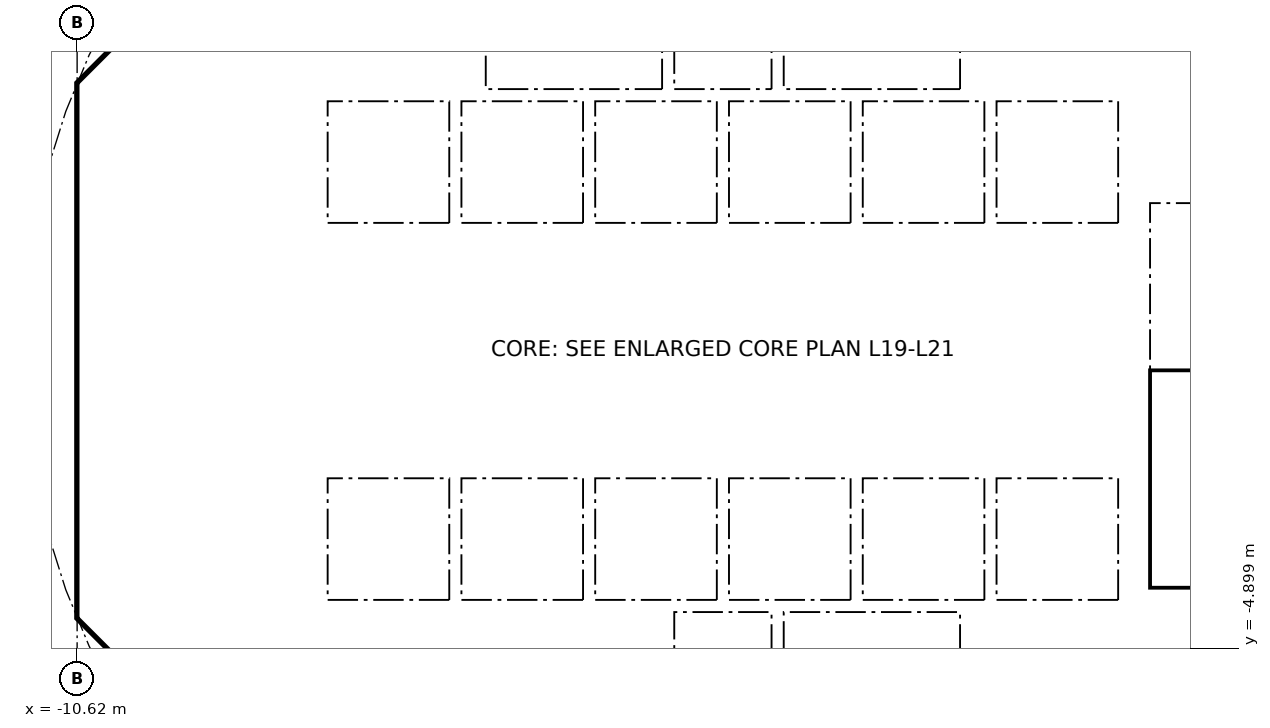
"""IFC4 building model, lengths in metres.
Left out: names, types, materials, properties, quantities, classifications, styles, units other than length and angle.
Written with IfcOpenShell. Run it as: python <this file> out.ifc"""

import sys

from ifc_helpers import new_model, si_unit, direction, frame, frame_2d, origin, place, context, subcontext, project, spatial, polyline, rectangle, outline, extrude, element, fill, save


model = new_model("IFC4")
c1 = context("Model", 3, precision=1e-05, world=origin(), true_north=direction((0.0, 1.0)))
c2 = subcontext(c1, "Body", "Model", "MODEL_VIEW")
j1 = project(units=[si_unit("LENGTHUNIT", "METRE"), si_unit("PLANEANGLEUNIT", "RADIAN")], contexts=[c1])
p1 = place(None, origin())
s1 = spatial("IfcSite", under=j1, at=p1, CompositionType="ELEMENT")
p2 = place(p1, origin())
s2 = spatial("IfcBuilding", under=s1, at=p2, CompositionType="ELEMENT")
p3 = place(p2, frame((0.0, 0.0, 88.1)))
s3 = spatial("IfcBuildingStorey", under=s2, at=p3, CompositionType="ELEMENT", Elevation=88.1)
p4 = place(p3, frame((9.988, 4.613, 0.0), z_axis=(0.0, 0.0, 1.0), x_axis=(-0.707106781187, 0.707106781187, 0.0)))
e1 = element("IfcWall", 1, at=p4, inside=s3, PredefinedType="SHEAR", context=c2, shape_type="SweptSolid", body=[
    extrude(rectangle(XDim=7.602, YDim=0.6, at=frame_2d((3.801, 0.0))), origin(), (0.0, 0.0, 1.0), 3.44),
])
p5 = place(p4, frame((3.201, 0.0, 0.0)))
e2 = element("IfcOpeningElement", 2, at=p5, cuts=e1, PredefinedType="OPENING", context=c2, shape_type="SweptSolid", body=[
    extrude(rectangle(XDim=1.2, YDim=2.1, at=frame_2d((0.6, 1.05))), frame((0.0, 0.31, 0.0), z_axis=(0.0, -1.0, 0.0), x_axis=(1.0, 0.0, 0.0)), (0.0, 0.0, 1.0), 0.62),
])
p6 = place(p3, frame((-4.613, 9.988, 0.0), z_axis=(0.0, 0.0, 1.0), x_axis=(-0.707106781187, -0.707106781187, 0.0)))
e3 = element("IfcWall", 3, at=p6, inside=s3, PredefinedType="SHEAR", context=c2, shape_type="SweptSolid", body=[
    extrude(rectangle(XDim=7.602, YDim=0.6, at=frame_2d((3.801, 0.0))), origin(), (0.0, 0.0, 1.0), 3.44),
])
p7 = place(p6, frame((0.351, 0.0, 0.0)))
e4 = element("IfcOpeningElement", 4, at=p7, cuts=e3, PredefinedType="OPENING", context=c2, shape_type="SweptSolid", body=[
    extrude(rectangle(XDim=1.1, YDim=2.1, at=frame_2d((0.55, 1.05))), frame((0.0, 0.31, 0.0), z_axis=(0.0, -1.0, 0.0), x_axis=(1.0, 0.0, 0.0)), (0.0, 0.0, 1.0), 0.62),
])
p8 = place(p3, frame((-10.325, 3.801, 0.0), z_axis=(0.0, 0.0, 1.0), x_axis=(0.0, -1.0, 0.0)))
e5 = element("IfcWall", 5, at=p8, inside=s3, PredefinedType="SHEAR", context=c2, shape_type="SweptSolid", body=[
    extrude(rectangle(XDim=7.602, YDim=0.6, at=frame_2d((3.801, 0.0))), origin(), (0.0, 0.0, 1.0), 3.44),
])
p9 = place(p8, frame((0.651, 0.0, 0.0)))
e6 = element("IfcOpeningElement", 6, at=p9, cuts=e5, PredefinedType="OPENING", context=c2, shape_type="SweptSolid", body=[
    extrude(rectangle(XDim=1.5, YDim=2.1, at=frame_2d((0.75, 1.05))), frame((0.0, 0.31, 0.0), z_axis=(0.0, -1.0, 0.0), x_axis=(1.0, 0.0, 0.0)), (0.0, 0.0, 1.0), 0.62),
])
p10 = place(p8, frame((5.451, 0.0, 0.0)))
e7 = element("IfcOpeningElement", 7, at=p10, cuts=e5, PredefinedType="OPENING", context=c2, shape_type="SweptSolid", body=[
    extrude(rectangle(XDim=1.5, YDim=2.1, at=frame_2d((0.75, 1.05))), frame((0.0, 0.31, 0.0), z_axis=(0.0, -1.0, 0.0), x_axis=(1.0, 0.0, 0.0)), (0.0, 0.0, 1.0), 0.62),
])
p11 = place(p3, frame((-9.988, -4.613, 0.0), z_axis=(0.0, 0.0, 1.0), x_axis=(0.707106781187, -0.707106781187, 0.0)))
e8 = element("IfcWall", 8, at=p11, inside=s3, PredefinedType="SHEAR", context=c2, shape_type="SweptSolid", body=[
    extrude(rectangle(XDim=7.602, YDim=0.6, at=frame_2d((3.801, 0.0))), origin(), (0.0, 0.0, 1.0), 3.44),
])
p12 = place(p11, frame((6.151, 0.0, 0.0)))
e9 = element("IfcOpeningElement", 9, at=p12, cuts=e8, PredefinedType="OPENING", context=c2, shape_type="SweptSolid", body=[
    extrude(rectangle(XDim=1.1, YDim=2.1, at=frame_2d((0.55, 1.05))), frame((0.0, 0.31, 0.0), z_axis=(0.0, -1.0, 0.0), x_axis=(1.0, 0.0, 0.0)), (0.0, 0.0, 1.0), 0.62),
])
p13 = place(p3, frame((4.613, -9.988, 0.0), z_axis=(0.0, 0.0, 1.0), x_axis=(0.707106781187, 0.707106781187, 0.0)))
e10 = element("IfcWall", 10, at=p13, inside=s3, PredefinedType="SHEAR", context=c2, shape_type="SweptSolid", body=[
    extrude(rectangle(XDim=7.602, YDim=0.6, at=frame_2d((3.801, 0.0))), origin(), (0.0, 0.0, 1.0), 3.44),
])
p14 = place(p13, frame((3.201, 0.0, 0.0)))
e11 = element("IfcOpeningElement", 11, at=p14, cuts=e10, PredefinedType="OPENING", context=c2, shape_type="SweptSolid", body=[
    extrude(rectangle(XDim=1.2, YDim=2.1, at=frame_2d((0.6, 1.05))), frame((0.0, 0.31, 0.0), z_axis=(0.0, -1.0, 0.0), x_axis=(1.0, 0.0, 0.0)), (0.0, 0.0, 1.0), 0.62),
])
p15 = place(p3, frame((-5.8, 4.3, 0.0), z_axis=(0.0, 0.0, 1.0), x_axis=(0.0, 1.0, 0.0)))
e12 = element("IfcWall", 12, at=p15, inside=s3, PredefinedType="PARTITIONING", context=c2, shape_type="SweptSolid", body=[
    extrude(rectangle(XDim=3.927, YDim=0.15, at=frame_2d((1.963, 0.0))), origin(), (0.0, 0.0, 1.0), 3.44),
])
p16 = place(p15, frame((1.551, 0.0, 0.0)))
e13 = element("IfcOpeningElement", 13, at=p16, cuts=e12, PredefinedType="OPENING", context=c2, shape_type="SweptSolid", body=[
    extrude(rectangle(XDim=0.9, YDim=2.1, at=frame_2d((0.45, 1.05))), frame((0.0, 0.085, 0.0), z_axis=(0.0, -1.0, 0.0), x_axis=(1.0, 0.0, 0.0)), (0.0, 0.0, 1.0), 0.17),
])
p17 = place(p3, frame((4.0, 4.3, 0.0), z_axis=(0.0, 0.0, 1.0), x_axis=(0.0, 1.0, 0.0)))
e14 = element("IfcWall", 14, at=p17, inside=s3, PredefinedType="SOLIDWALL", context=c2, shape_type="SweptSolid", body=[
    extrude(rectangle(XDim=2.2, YDim=0.2, at=frame_2d((1.1, 0.0))), origin(), (0.0, 0.0, 1.0), 3.44),
])
p18 = place(p17, frame((0.55, 0.0, 0.0)))
e15 = element("IfcOpeningElement", 15, at=p18, cuts=e14, PredefinedType="OPENING", context=c2, shape_type="SweptSolid", body=[
    extrude(rectangle(XDim=1.1, YDim=2.1, at=frame_2d((0.55, 1.05))), frame((0.0, 0.11, 0.0), z_axis=(0.0, -1.0, 0.0), x_axis=(1.0, 0.0, 0.0)), (0.0, 0.0, 1.0), 0.22),
])
p19 = place(p3, frame((-4.0, 4.3, 0.0), z_axis=(0.0, 0.0, 1.0), x_axis=(0.0, 1.0, 0.0)))
e16 = element("IfcWall", 16, at=p19, inside=s3, PredefinedType="SOLIDWALL", context=c2, shape_type="SweptSolid", body=[
    extrude(rectangle(XDim=2.2, YDim=0.2, at=frame_2d((1.1, 0.0))), origin(), (0.0, 0.0, 1.0), 3.44),
])
p20 = place(p19, frame((0.55, 0.0, 0.0)))
e17 = element("IfcOpeningElement", 17, at=p20, cuts=e16, PredefinedType="OPENING", context=c2, shape_type="SweptSolid", body=[
    extrude(rectangle(XDim=1.1, YDim=2.1, at=frame_2d((0.55, 1.05))), frame((0.0, 0.11, 0.0), z_axis=(0.0, -1.0, 0.0), x_axis=(1.0, 0.0, 0.0)), (0.0, 0.0, 1.0), 0.22),
])
p21 = place(p3, frame((-6.7, 2.0, 0.0), z_axis=(0.0, 0.0, 1.0), x_axis=(1.0, 0.0, 0.0)))
e18 = element("IfcWall", 18, at=p21, inside=s3, PredefinedType="SOLIDWALL", context=c2, shape_type="SweptSolid", body=[
    extrude(rectangle(XDim=13.4, YDim=0.2, at=frame_2d((6.7, 0.0))), origin(), (0.0, 0.0, 1.0), 3.44),
])
p22 = place(p21, frame((0.65, 0.0, 0.0)))
e19 = element("IfcOpeningElement", 19, at=p22, cuts=e18, PredefinedType="OPENING", context=c2, shape_type="SweptSolid", body=[
    extrude(rectangle(XDim=1.1, YDim=2.1, at=frame_2d((0.55, 1.05))), frame((0.0, 0.11, 0.0), z_axis=(0.0, -1.0, 0.0), x_axis=(1.0, 0.0, 0.0)), (0.0, 0.0, 1.0), 0.22),
])
p23 = place(p21, frame((2.85, 0.0, 0.0)))
e20 = element("IfcOpeningElement", 20, at=p23, cuts=e18, PredefinedType="OPENING", context=c2, shape_type="SweptSolid", body=[
    extrude(rectangle(XDim=1.1, YDim=2.1, at=frame_2d((0.55, 1.05))), frame((0.0, 0.11, 0.0), z_axis=(0.0, -1.0, 0.0), x_axis=(1.0, 0.0, 0.0)), (0.0, 0.0, 1.0), 0.22),
])
p24 = place(p21, frame((5.05, 0.0, 0.0)))
e21 = element("IfcOpeningElement", 21, at=p24, cuts=e18, PredefinedType="OPENING", context=c2, shape_type="SweptSolid", body=[
    extrude(rectangle(XDim=1.1, YDim=2.1, at=frame_2d((0.55, 1.05))), frame((0.0, 0.11, 0.0), z_axis=(0.0, -1.0, 0.0), x_axis=(1.0, 0.0, 0.0)), (0.0, 0.0, 1.0), 0.22),
])
p25 = place(p3, frame((6.7, 4.0, 0.0), z_axis=(0.0, 0.0, 1.0), x_axis=(1.0, 0.0, 0.0)))
e22 = element("IfcWall", 22, at=p25, inside=s3, PredefinedType="SOLIDWALL", context=c2, shape_type="SweptSolid", body=[
    extrude(rectangle(XDim=3.325, YDim=0.2, at=frame_2d((1.662, 0.0))), origin(), (0.0, 0.0, 1.0), 3.44),
])
p26 = place(p25, frame((1.25, 0.0, 0.0)))
e23 = element("IfcOpeningElement", 23, at=p26, cuts=e22, PredefinedType="OPENING", context=c2, shape_type="SweptSolid", body=[
    extrude(rectangle(XDim=1.1, YDim=2.1, at=frame_2d((0.55, 1.05))), frame((0.0, 0.11, 0.0), z_axis=(0.0, -1.0, 0.0), x_axis=(1.0, 0.0, 0.0)), (0.0, 0.0, 1.0), 0.22),
])
p27 = place(p3, frame((-6.2, -7.827, 0.0), z_axis=(0.0, 0.0, 1.0), x_axis=(0.0, 1.0, 0.0)))
e24 = element("IfcWall", 24, at=p27, inside=s3, PredefinedType="PARTITIONING", context=c2, shape_type="SweptSolid", body=[
    extrude(rectangle(XDim=3.527, YDim=0.15, at=frame_2d((1.763, 0.0))), origin(), (0.0, 0.0, 1.0), 3.44),
])
p28 = place(p27, frame((2.365, 0.0, 0.0)))
e25 = element("IfcOpeningElement", 25, at=p28, cuts=e24, PredefinedType="OPENING", context=c2, shape_type="SweptSolid", body=[
    extrude(rectangle(XDim=0.9, YDim=2.1, at=frame_2d((0.45, 1.05))), frame((0.0, 0.085, 0.0), z_axis=(0.0, -1.0, 0.0), x_axis=(1.0, 0.0, 0.0)), (0.0, 0.0, 1.0), 0.17),
])
p29 = place(p27, frame((0.489, 0.0, 0.0)))
e26 = element("IfcOpeningElement", 26, at=p29, cuts=e24, PredefinedType="OPENING", context=c2, shape_type="SweptSolid", body=[
    extrude(rectangle(XDim=0.9, YDim=2.1, at=frame_2d((0.45, 1.05))), frame((0.0, 0.085, 0.0), z_axis=(0.0, -1.0, 0.0), x_axis=(1.0, 0.0, 0.0)), (0.0, 0.0, 1.0), 0.17),
])
p30 = place(p3, frame((4.0, -6.5, 0.0), z_axis=(0.0, 0.0, 1.0), x_axis=(0.0, 1.0, 0.0)))
e27 = element("IfcWall", 27, at=p30, inside=s3, PredefinedType="SOLIDWALL", context=c2, shape_type="SweptSolid", body=[
    extrude(rectangle(XDim=2.2, YDim=0.2, at=frame_2d((1.1, 0.0))), origin(), (0.0, 0.0, 1.0), 3.44),
])
p31 = place(p30, frame((0.55, 0.0, 0.0)))
e28 = element("IfcOpeningElement", 28, at=p31, cuts=e27, PredefinedType="OPENING", context=c2, shape_type="SweptSolid", body=[
    extrude(rectangle(XDim=1.1, YDim=2.1, at=frame_2d((0.55, 1.05))), frame((0.0, 0.11, 0.0), z_axis=(0.0, -1.0, 0.0), x_axis=(1.0, 0.0, 0.0)), (0.0, 0.0, 1.0), 0.22),
])
p32 = place(p3, frame((-4.0, -6.5, 0.0), z_axis=(0.0, 0.0, 1.0), x_axis=(0.0, 1.0, 0.0)))
e29 = element("IfcWall", 29, at=p32, inside=s3, PredefinedType="SOLIDWALL", context=c2, shape_type="SweptSolid", body=[
    extrude(rectangle(XDim=2.2, YDim=0.2, at=frame_2d((1.1, 0.0))), origin(), (0.0, 0.0, 1.0), 3.44),
])
p33 = place(p32, frame((0.65, 0.0, 0.0)))
e30 = element("IfcOpeningElement", 30, at=p33, cuts=e29, PredefinedType="OPENING", context=c2, shape_type="SweptSolid", body=[
    extrude(rectangle(XDim=0.9, YDim=2.1, at=frame_2d((0.45, 1.05))), frame((0.0, 0.11, 0.0), z_axis=(0.0, -1.0, 0.0), x_axis=(1.0, 0.0, 0.0)), (0.0, 0.0, 1.0), 0.22),
])
p34 = place(p3, frame((-6.7, -2.0, 0.0), z_axis=(0.0, 0.0, 1.0), x_axis=(1.0, 0.0, 0.0)))
e31 = element("IfcWall", 31, at=p34, inside=s3, PredefinedType="SOLIDWALL", context=c2, shape_type="SweptSolid", body=[
    extrude(rectangle(XDim=13.4, YDim=0.2, at=frame_2d((6.7, 0.0))), origin(), (0.0, 0.0, 1.0), 3.44),
])
p35 = place(p34, frame((0.65, 0.0, 0.0)))
e32 = element("IfcOpeningElement", 32, at=p35, cuts=e31, PredefinedType="OPENING", context=c2, shape_type="SweptSolid", body=[
    extrude(rectangle(XDim=1.1, YDim=2.1, at=frame_2d((0.55, 1.05))), frame((0.0, 0.11, 0.0), z_axis=(0.0, -1.0, 0.0), x_axis=(1.0, 0.0, 0.0)), (0.0, 0.0, 1.0), 0.22),
])
p36 = place(p34, frame((2.85, 0.0, 0.0)))
e33 = element("IfcOpeningElement", 33, at=p36, cuts=e31, PredefinedType="OPENING", context=c2, shape_type="SweptSolid", body=[
    extrude(rectangle(XDim=1.1, YDim=2.1, at=frame_2d((0.55, 1.05))), frame((0.0, 0.11, 0.0), z_axis=(0.0, -1.0, 0.0), x_axis=(1.0, 0.0, 0.0)), (0.0, 0.0, 1.0), 0.22),
])
p37 = place(p3, origin())
e34 = element("IfcWall", 34, at=p37, inside=s3, PredefinedType="SHEAR", context=c2, shape_type="SweptSolid", body=[
    extrude(outline(polyline([(-10.625, -3.801), (-10.025, -3.801), (-10.025, -4.152), (-9.776, -4.401), (-10.2, -4.825), (-10.625, -4.401), (-10.625, -3.801)])), origin(), (0.0, 0.0, 1.0), 3.44),
])
p38 = place(p3, origin())
e35 = element("IfcWall", 35, at=p38, inside=s3, PredefinedType="SHEAR", context=c2, shape_type="SweptSolid", body=[
    extrude(outline(polyline([(-10.2, 4.825), (-9.776, 4.401), (-10.025, 4.152), (-10.025, 3.801), (-10.625, 3.801), (-10.625, 4.401), (-10.2, 4.825)])), origin(), (0.0, 0.0, 1.0), 3.44),
])
for number, where, z_axis, x_axis in (
    (36, (-0.9, -6.5, 0.0), (0.0, 0.0, 1.0), (0.0, 1.0, 0.0)),
    (37, (0.9, -6.5, 0.0), (0.0, 0.0, 1.0), (0.0, 1.0, 0.0)),
):
    element("IfcWall", number, at=place(p3, frame(where, z_axis=z_axis, x_axis=x_axis)), inside=s3, PredefinedType="SOLIDWALL", context=c2, shape_type="SweptSolid", body=[
        extrude(rectangle(XDim=2.2, YDim=0.2, at=frame_2d((1.1, 0.0))), origin(), (0.0, 0.0, 1.0), 3.44),
    ])
p39 = place(p3, origin())
e38 = element("IfcWall", 38, at=p39, inside=s3, PredefinedType="SOLIDWALL", context=c2, shape_type="SweptSolid", body=[
    extrude(outline(polyline([(-6.7, -2.1), (-6.5, -2.1), (-6.5, -4.1), (-4.5, -4.1), (-4.5, -2.1), (-4.3, -2.1), (-4.3, -4.1), (-2.3, -4.1), (-2.3, -2.1), (-2.1, -2.1), (-2.1, -4.1), (-0.1, -4.1), (-0.1, -2.1), (0.1, -2.1), (0.1, -4.1), (2.1, -4.1), (2.1, -2.1), (2.3, -2.1), (2.3, -4.1), (4.3, -4.1), (4.3, -2.1), (4.5, -2.1), (4.5, -4.1), (6.5, -4.1), (6.5, -2.1), (6.7, -2.1), (6.7, -4.3), (-6.7, -4.3), (-6.7, -2.1)])), origin(), (0.0, 0.0, 1.0), 3.44),
])
for number, where, z_axis, x_axis in (
    (39, (-0.9, 4.3, 0.0), (0.0, 0.0, 1.0), (0.0, 1.0, 0.0)),
    (40, (0.9, 4.3, 0.0), (0.0, 0.0, 1.0), (0.0, 1.0, 0.0)),
):
    element("IfcWall", number, at=place(p3, frame(where, z_axis=z_axis, x_axis=x_axis)), inside=s3, PredefinedType="SOLIDWALL", context=c2, shape_type="SweptSolid", body=[
        extrude(rectangle(XDim=2.2, YDim=0.2, at=frame_2d((1.1, 0.0))), origin(), (0.0, 0.0, 1.0), 3.44),
    ])
p40 = place(p3, origin())
e41 = element("IfcWall", 41, at=p40, inside=s3, PredefinedType="SOLIDWALL", context=c2, shape_type="SweptSolid", body=[
    extrude(outline(polyline([(-6.5, 2.1), (-6.7, 2.1), (-6.7, 4.3), (6.7, 4.3), (6.7, 2.1), (6.5, 2.1), (6.5, 4.1), (4.5, 4.1), (4.5, 2.1), (4.3, 2.1), (4.3, 4.1), (2.3, 4.1), (2.3, 2.1), (2.1, 2.1), (2.1, 4.1), (0.1, 4.1), (0.1, 2.1), (-0.1, 2.1), (-0.1, 4.1), (-2.1, 4.1), (-2.1, 2.1), (-2.3, 2.1), (-2.3, 4.1), (-4.3, 4.1), (-4.3, 2.1), (-4.5, 2.1), (-4.5, 4.1), (-6.5, 4.1), (-6.5, 2.1)])), origin(), (0.0, 0.0, 1.0), 3.44),
])
for number, where, z_axis, x_axis in (
    (42, (-10.025, -4.0, 0.0), (0.0, 0.0, 1.0), (1.0, 0.0, 0.0)),
    (43, (-10.025, 4.0, 0.0), (0.0, 0.0, 1.0), (1.0, 0.0, 0.0)),
):
    element("IfcWall", number, at=place(p3, frame(where, z_axis=z_axis, x_axis=x_axis)), inside=s3, PredefinedType="PARTITIONING", context=c2, shape_type="SweptSolid", body=[
        extrude(rectangle(XDim=3.325, YDim=0.2, at=frame_2d((1.662, 0.0))), origin(), (0.0, 0.0, 1.0), 3.44),
    ])
p41 = place(p3, origin())
e44 = element("IfcWall", 44, at=p41, inside=s3, PredefinedType="SOLIDWALL", context=c2, shape_type="SweptSolid", body=[
    extrude(outline(polyline([(7.025, -3.9), (6.7, -3.9), (6.7, 3.9), (7.025, 3.9), (7.025, -3.9)])), origin(), (0.0, 0.0, 1.0), 3.44),
])
p42 = place(p3, origin())
e45 = element("IfcWall", 45, at=p42, inside=s3, PredefinedType="SOLIDWALL", context=c2, shape_type="SweptSolid", body=[
    extrude(outline(polyline([(10.025, -4.1), (6.7, -4.1), (6.7, -3.9), (10.025, -3.9), (10.025, -4.1)])), origin(), (0.0, 0.0, 1.0), 3.44),
])
p43 = place(p22, origin())
e46 = element("IfcDoor", 46, at=p43, inside=s3, OperationType="DOUBLE_DOOR_SLIDING", PredefinedType="DOOR", context=c2, shape_type="SweptSolid", body=[
    extrude(rectangle(XDim=1.1, YDim=2.1, at=frame_2d((0.55, 1.05))), frame((0.0, 0.025, 0.0), z_axis=(0.0, -1.0, 0.0), x_axis=(1.0, 0.0, 0.0)), (0.0, 0.0, 1.0), 0.05),
])
fill(e19, e46)
p44 = place(p23, origin())
e47 = element("IfcDoor", 47, at=p44, inside=s3, OperationType="DOUBLE_DOOR_SLIDING", PredefinedType="DOOR", context=c2, shape_type="SweptSolid", body=[
    extrude(rectangle(XDim=1.1, YDim=2.1, at=frame_2d((0.55, 1.05))), frame((0.0, 0.025, 0.0), z_axis=(0.0, -1.0, 0.0), x_axis=(1.0, 0.0, 0.0)), (0.0, 0.0, 1.0), 0.05),
])
fill(e20, e47)
p45 = place(p24, origin())
e48 = element("IfcDoor", 48, at=p45, inside=s3, OperationType="DOUBLE_DOOR_SLIDING", PredefinedType="DOOR", context=c2, shape_type="SweptSolid", body=[
    extrude(rectangle(XDim=1.1, YDim=2.1, at=frame_2d((0.55, 1.05))), frame((0.0, 0.025, 0.0), z_axis=(0.0, -1.0, 0.0), x_axis=(1.0, 0.0, 0.0)), (0.0, 0.0, 1.0), 0.05),
])
fill(e21, e48)
p46 = place(p35, origin())
e49 = element("IfcDoor", 49, at=p46, inside=s3, OperationType="DOUBLE_DOOR_SLIDING", PredefinedType="DOOR", context=c2, shape_type="SweptSolid", body=[
    extrude(rectangle(XDim=1.1, YDim=2.1, at=frame_2d((0.55, 1.05))), frame((0.0, 0.025, 0.0), z_axis=(0.0, -1.0, 0.0), x_axis=(1.0, 0.0, 0.0)), (0.0, 0.0, 1.0), 0.05),
])
fill(e32, e49)
p47 = place(p36, origin())
e50 = element("IfcDoor", 50, at=p47, inside=s3, OperationType="DOUBLE_DOOR_SLIDING", PredefinedType="DOOR", context=c2, shape_type="SweptSolid", body=[
    extrude(rectangle(XDim=1.1, YDim=2.1, at=frame_2d((0.55, 1.05))), frame((0.0, 0.025, 0.0), z_axis=(0.0, -1.0, 0.0), x_axis=(1.0, 0.0, 0.0)), (0.0, 0.0, 1.0), 0.05),
])
fill(e33, e50)
p48 = place(p18, origin())
e51 = element("IfcDoor", 51, at=p48, inside=s3, OperationType="DOUBLE_DOOR_SLIDING", PredefinedType="DOOR", context=c2, shape_type="SweptSolid", body=[
    extrude(rectangle(XDim=1.1, YDim=2.1, at=frame_2d((0.55, 1.05))), frame((0.0, 0.025, 0.0), z_axis=(0.0, -1.0, 0.0), x_axis=(1.0, 0.0, 0.0)), (0.0, 0.0, 1.0), 0.05),
])
fill(e15, e51)
p49 = place(p31, origin())
e52 = element("IfcDoor", 52, at=p49, inside=s3, OperationType="DOUBLE_DOOR_SLIDING", PredefinedType="DOOR", context=c2, shape_type="SweptSolid", body=[
    extrude(rectangle(XDim=1.1, YDim=2.1, at=frame_2d((0.55, 1.05))), frame((0.0, 0.025, 0.0), z_axis=(0.0, -1.0, 0.0), x_axis=(1.0, 0.0, 0.0)), (0.0, 0.0, 1.0), 0.05),
])
fill(e28, e52)
p50 = place(p20, origin())
e53 = element("IfcDoor", 53, at=p50, inside=s3, OperationType="DOUBLE_DOOR_SLIDING", PredefinedType="DOOR", context=c2, shape_type="SweptSolid", body=[
    extrude(rectangle(XDim=1.1, YDim=2.1, at=frame_2d((0.55, 1.05))), frame((0.0, 0.025, 0.0), z_axis=(0.0, -1.0, 0.0), x_axis=(1.0, 0.0, 0.0)), (0.0, 0.0, 1.0), 0.05),
])
fill(e17, e53)
p51 = place(p28, origin())
e54 = element("IfcDoor", 54, at=p51, inside=s3, OperationType="SINGLE_SWING_RIGHT", PredefinedType="DOOR", context=c2, shape_type="SweptSolid", body=[
    extrude(rectangle(XDim=0.9, YDim=2.1, at=frame_2d((0.45, 1.05))), frame((0.0, 0.025, 0.0), z_axis=(0.0, -1.0, 0.0), x_axis=(1.0, 0.0, 0.0)), (0.0, 0.0, 1.0), 0.05),
])
fill(e25, e54)
p52 = place(p9, origin())
e55 = element("IfcDoor", 55, at=p52, inside=s3, OperationType="DOUBLE_DOOR_SINGLE_SWING", PredefinedType="DOOR", context=c2, shape_type="SweptSolid", body=[
    extrude(rectangle(XDim=1.5, YDim=2.1, at=frame_2d((0.75, 1.05))), frame((0.0, 0.025, 0.0), z_axis=(0.0, -1.0, 0.0), x_axis=(1.0, 0.0, 0.0)), (0.0, 0.0, 1.0), 0.05),
])
fill(e6, e55)
p53 = place(p10, origin())
e56 = element("IfcDoor", 56, at=p53, inside=s3, OperationType="DOUBLE_DOOR_SINGLE_SWING", PredefinedType="DOOR", context=c2, shape_type="SweptSolid", body=[
    extrude(rectangle(XDim=1.5, YDim=2.1, at=frame_2d((0.75, 1.05))), frame((0.0, 0.025, 0.0), z_axis=(0.0, -1.0, 0.0), x_axis=(1.0, 0.0, 0.0)), (0.0, 0.0, 1.0), 0.05),
])
fill(e7, e56)
save(model, sys.argv[1])
